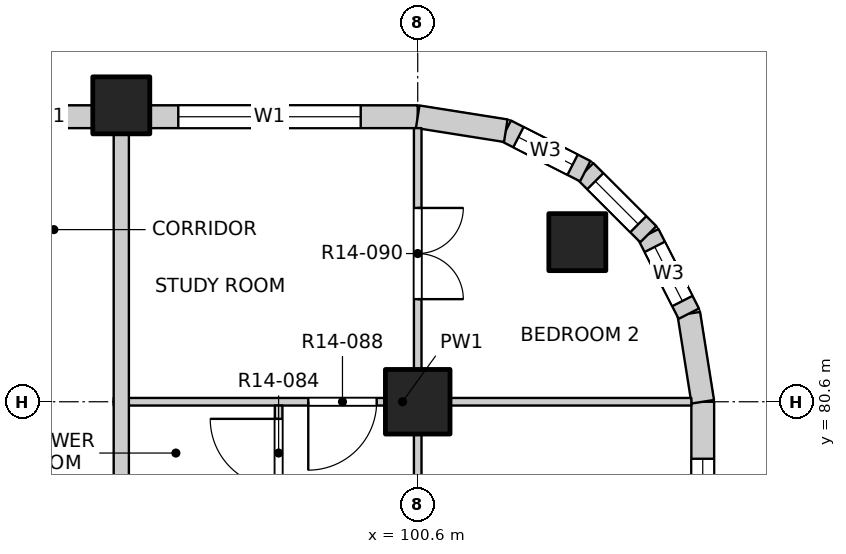
"""IFC4 building model, lengths in metres.
Left out: names, types, materials, properties, quantities, classifications, styles, units other than length and angle.
Written with IfcOpenShell. Run it as: python <this file> out.ifc"""

import sys

from ifc_helpers import new_model, si_unit, direction, frame, frame_2d, origin, origin_2d, place, context, subcontext, project, spatial, rectangle, extrude, element, fill, save


model = new_model("IFC4")
c1 = context("Model", 3, precision=1e-05, world=origin(), true_north=direction((0.0, 1.0)))
c2 = subcontext(c1, "Body", "Model", "MODEL_VIEW")
j1 = project(units=[si_unit("LENGTHUNIT", "METRE"), si_unit("PLANEANGLEUNIT", "RADIAN")], contexts=[c1])
p1 = place(None, origin())
s1 = spatial("IfcSite", under=j1, at=p1, CompositionType="ELEMENT")
p2 = place(p1, origin())
s2 = spatial("IfcBuilding", under=s1, at=p2, CompositionType="ELEMENT")
p3 = place(p2, frame((0.0, 0.0, 152.0)))
s3 = spatial("IfcBuildingStorey", under=s2, at=p3, CompositionType="ELEMENT", Elevation=152.0)
for number, where, z_axis, x_axis in (
    (1, (102.7, 82.7, -0.25), (0.0, 0.0, 1.0), (1.0, 0.0, 0.0)),
    (2, (96.7, 84.5, -0.25), (0.0, 0.0, 1.0), (1.0, 0.0, 0.0)),
):
    element("IfcColumn", number, at=place(p3, frame(where, z_axis=z_axis, x_axis=x_axis)), inside=s3, PredefinedType="COLUMN", context=c2, shape_type="SweptSolid", body=[
        extrude(rectangle(XDim=0.75, YDim=0.75, at=origin_2d()), origin(), (0.0, 0.0, 1.0), 3.4),
    ])
p4 = place(p3, frame((100.6, 80.6, -0.25), z_axis=(0.0, 0.0, 1.0), x_axis=(1.0, 0.0, 0.0)))
e3 = element("IfcColumn", 3, at=p4, inside=s3, PredefinedType="COLUMN", context=c2, shape_type="SweptSolid", body=[
    extrude(rectangle(XDim=0.85, YDim=0.85, at=origin_2d()), origin(), (0.0, 0.0, 1.0), 3.4),
])
p5 = place(p3, frame((104.35, 77.075, 0.0), z_axis=(0.0, 0.0, 1.0), x_axis=(0.0, 1.0, 0.0)))
e4 = element("IfcWall", 4, at=p5, inside=s3, PredefinedType="SOLIDWALL", context=c2, shape_type="SweptSolid", body=[
    extrude(rectangle(XDim=3.525, YDim=0.3, at=frame_2d((1.763, 0.0))), origin(), (0.0, 0.0, 1.0), 2.7),
])
p6 = place(p5, frame((0.375, 0.0, 0.9)))
e5 = element("IfcOpeningElement", 5, at=p6, cuts=e4, PredefinedType="OPENING", context=c2, shape_type="SweptSolid", body=[
    extrude(rectangle(XDim=2.4, YDim=1.8, at=frame_2d((1.2, 0.9))), frame((0.0, 0.16, 0.0), z_axis=(0.0, -1.0, 0.0), x_axis=(1.0, 0.0, 0.0)), (0.0, 0.0, 1.0), 0.32),
])
p7 = place(p3, frame((95.025, 84.35, 0.0), z_axis=(0.0, 0.0, 1.0), x_axis=(1.0, 0.0, 0.0)))
e6 = element("IfcWall", 6, at=p7, inside=s3, PredefinedType="SOLIDWALL", context=c2, shape_type="SweptSolid", body=[
    extrude(rectangle(XDim=1.3, YDim=0.3, at=frame_2d((0.65, 0.0))), origin(), (0.0, 0.0, 1.0), 2.7),
])
p8 = place(p3, frame((97.075, 84.35, 0.0), z_axis=(0.0, 0.0, 1.0), x_axis=(1.0, 0.0, 0.0)))
e7 = element("IfcWall", 7, at=p8, inside=s3, PredefinedType="SOLIDWALL", context=c2, shape_type="SweptSolid", body=[
    extrude(rectangle(XDim=3.525, YDim=0.3, at=frame_2d((1.763, 0.0))), origin(), (0.0, 0.0, 1.0), 2.7),
])
p9 = place(p8, frame((0.375, 0.0, 0.9)))
e8 = element("IfcOpeningElement", 8, at=p9, cuts=e7, PredefinedType="OPENING", context=c2, shape_type="SweptSolid", body=[
    extrude(rectangle(XDim=2.4, YDim=1.8, at=frame_2d((1.2, 0.9))), frame((0.0, 0.16, 0.0), z_axis=(0.0, -1.0, 0.0), x_axis=(1.0, 0.0, 0.0)), (0.0, 0.0, 1.0), 0.32),
])
p10 = place(p3, frame((104.35, 80.6, 0.0), z_axis=(0.0, 0.0, 1.0), x_axis=(-0.156496880861, 0.987678452879, 0.0)))
e9 = element("IfcWall", 9, at=p10, inside=s3, PredefinedType="SOLIDWALL", context=c2, shape_type="SweptSolid", body=[
    extrude(rectangle(XDim=1.173, YDim=0.3, at=frame_2d((0.586, 0.0))), origin(), (0.0, 0.0, 1.0), 2.7),
])
p11 = place(p3, frame((104.167, 81.759, 0.0), z_axis=(0.0, 0.0, 1.0), x_axis=(-0.454025524128, 0.890988677504, 0.0)))
e10 = element("IfcWall", 10, at=p11, inside=s3, PredefinedType="SOLIDWALL", context=c2, shape_type="SweptSolid", body=[
    extrude(rectangle(XDim=1.173, YDim=0.3, at=frame_2d((0.587, 0.0))), origin(), (0.0, 0.0, 1.0), 2.7),
])
p12 = place(p11, frame((0.187, 0.0, 0.9)))
e11 = element("IfcOpeningElement", 11, at=p12, cuts=e10, PredefinedType="OPENING", context=c2, shape_type="SweptSolid", body=[
    extrude(rectangle(XDim=0.8, YDim=1.2, at=frame_2d((0.4, 0.6))), frame((0.0, 0.16, 0.0), z_axis=(0.0, -1.0, 0.0), x_axis=(1.0, 0.0, 0.0)), (0.0, 0.0, 1.0), 0.32),
])
p13 = place(p3, frame((103.634, 82.804, 0.0), z_axis=(0.0, 0.0, 1.0), x_axis=(-0.707106781187, 0.707106781187, 0.0)))
e12 = element("IfcWall", 12, at=p13, inside=s3, PredefinedType="SOLIDWALL", context=c2, shape_type="SweptSolid", body=[
    extrude(rectangle(XDim=1.173, YDim=0.3, at=frame_2d((0.586, 0.0))), origin(), (0.0, 0.0, 1.0), 2.7),
])
p14 = place(p13, frame((0.187, 0.0, 0.9)))
e13 = element("IfcOpeningElement", 13, at=p14, cuts=e12, PredefinedType="OPENING", context=c2, shape_type="SweptSolid", body=[
    extrude(rectangle(XDim=0.8, YDim=1.2, at=frame_2d((0.4, 0.6))), frame((0.0, 0.16, 0.0), z_axis=(0.0, -1.0, 0.0), x_axis=(1.0, 0.0, 0.0)), (0.0, 0.0, 1.0), 0.32),
])
p15 = place(p3, frame((102.804, 83.634, 0.0), z_axis=(0.0, 0.0, 1.0), x_axis=(-0.890988677504, 0.454025524128, 0.0)))
e14 = element("IfcWall", 14, at=p15, inside=s3, PredefinedType="SOLIDWALL", context=c2, shape_type="SweptSolid", body=[
    extrude(rectangle(XDim=1.173, YDim=0.3, at=frame_2d((0.587, 0.0))), origin(), (0.0, 0.0, 1.0), 2.7),
])
p16 = place(p15, frame((0.187, 0.0, 0.9)))
e15 = element("IfcOpeningElement", 15, at=p16, cuts=e14, PredefinedType="OPENING", context=c2, shape_type="SweptSolid", body=[
    extrude(rectangle(XDim=0.8, YDim=1.2, at=frame_2d((0.4, 0.6))), frame((0.0, 0.16, 0.0), z_axis=(0.0, -1.0, 0.0), x_axis=(1.0, 0.0, 0.0)), (0.0, 0.0, 1.0), 0.32),
])
p17 = place(p3, frame((101.759, 84.167, 0.0), z_axis=(0.0, 0.0, 1.0), x_axis=(-0.987678452879, 0.156496880861, 0.0)))
e16 = element("IfcWall", 16, at=p17, inside=s3, PredefinedType="SOLIDWALL", context=c2, shape_type="SweptSolid", body=[
    extrude(rectangle(XDim=1.173, YDim=0.3, at=frame_2d((0.586, 0.0))), origin(), (0.0, 0.0, 1.0), 2.7),
])
p18 = place(p3, frame((96.6, 80.6, 0.0), z_axis=(0.0, 0.0, 1.0), x_axis=(1.0, 0.0, 0.0)))
e17 = element("IfcWall", 17, at=p18, inside=s3, PredefinedType="PARTITIONING", context=c2, shape_type="SweptSolid", body=[
    extrude(rectangle(XDim=7.6, YDim=0.1, at=frame_2d((3.8, 0.0))), origin(), (0.0, 0.0, 1.0), 3.15),
])
p19 = place(p18, frame((2.56, 0.0, 0.0)))
e18 = element("IfcOpeningElement", 18, at=p19, cuts=e17, PredefinedType="OPENING", context=c2, shape_type="SweptSolid", body=[
    extrude(rectangle(XDim=0.9, YDim=2.1, at=frame_2d((0.45, 1.05))), frame((0.0, 0.06, 0.0), z_axis=(0.0, -1.0, 0.0), x_axis=(1.0, 0.0, 0.0)), (0.0, 0.0, 1.0), 0.12),
])
p20 = place(p3, frame((96.7, 49.5, 0.0), z_axis=(0.0, 0.0, 1.0), x_axis=(0.0, 1.0, 0.0)))
e19 = element("IfcWall", 19, at=p20, inside=s3, PredefinedType="PARTITIONING", context=c2, shape_type="SweptSolid", body=[
    extrude(rectangle(XDim=34.7, YDim=0.2, at=frame_2d((17.35, 0.0))), origin(), (0.0, 0.0, 1.0), 3.15),
])
p21 = place(p20, frame((3.225, 0.0, 0.0)))
e20 = element("IfcOpeningElement", 20, at=p21, cuts=e19, PredefinedType="OPENING", context=c2, shape_type="SweptSolid", body=[
    extrude(rectangle(XDim=1.0, YDim=2.1, at=frame_2d((0.5, 1.05))), frame((0.0, 0.11, 0.0), z_axis=(0.0, -1.0, 0.0), x_axis=(1.0, 0.0, 0.0)), (0.0, 0.0, 1.0), 0.22),
])
p22 = place(p20, frame((19.775, 0.0, 0.0)))
e21 = element("IfcOpeningElement", 21, at=p22, cuts=e19, PredefinedType="OPENING", context=c2, shape_type="SweptSolid", body=[
    extrude(rectangle(XDim=1.0, YDim=2.1, at=frame_2d((0.5, 1.05))), frame((0.0, 0.11, 0.0), z_axis=(0.0, -1.0, 0.0), x_axis=(1.0, 0.0, 0.0)), (0.0, 0.0, 1.0), 0.22),
])
p23 = place(p20, frame((24.125, 0.0, 0.0)))
e22 = element("IfcOpeningElement", 22, at=p23, cuts=e19, PredefinedType="OPENING", context=c2, shape_type="SweptSolid", body=[
    extrude(rectangle(XDim=1.0, YDim=2.1, at=frame_2d((0.5, 1.05))), frame((0.0, 0.11, 0.0), z_axis=(0.0, -1.0, 0.0), x_axis=(1.0, 0.0, 0.0)), (0.0, 0.0, 1.0), 0.22),
])
p24 = place(p3, frame((98.77, 75.95, 0.0), z_axis=(0.0, 0.0, 1.0), x_axis=(0.0, 1.0, 0.0)))
e23 = element("IfcWall", 23, at=p24, inside=s3, PredefinedType="PARTITIONING", context=c2, shape_type="SweptSolid", body=[
    extrude(rectangle(XDim=4.6, YDim=0.1, at=frame_2d((2.3, 0.0))), origin(), (0.0, 0.0, 1.0), 3.15),
])
p25 = place(p24, frame((0.175, 0.0, 0.0)))
e24 = element("IfcOpeningElement", 24, at=p25, cuts=e23, PredefinedType="OPENING", context=c2, shape_type="SweptSolid", body=[
    extrude(rectangle(XDim=0.8, YDim=2.1, at=frame_2d((0.4, 1.05))), frame((0.0, 0.06, 0.0), z_axis=(0.0, -1.0, 0.0), x_axis=(1.0, 0.0, 0.0)), (0.0, 0.0, 1.0), 0.12),
])
p26 = place(p24, frame((1.8, 0.0, 0.0)))
e25 = element("IfcOpeningElement", 25, at=p26, cuts=e23, PredefinedType="OPENING", context=c2, shape_type="SweptSolid", body=[
    extrude(rectangle(XDim=0.9, YDim=2.1, at=frame_2d((0.45, 1.05))), frame((0.0, 0.06, 0.0), z_axis=(0.0, -1.0, 0.0), x_axis=(1.0, 0.0, 0.0)), (0.0, 0.0, 1.0), 0.12),
])
p27 = place(p24, frame((3.525, 0.0, 0.0)))
e26 = element("IfcOpeningElement", 26, at=p27, cuts=e23, PredefinedType="OPENING", context=c2, shape_type="SweptSolid", body=[
    extrude(rectangle(XDim=0.9, YDim=2.1, at=frame_2d((0.45, 1.05))), frame((0.0, 0.06, 0.0), z_axis=(0.0, -1.0, 0.0), x_axis=(1.0, 0.0, 0.0)), (0.0, 0.0, 1.0), 0.12),
])
p28 = place(p3, frame((100.6, 45.8, 0.0), z_axis=(0.0, 0.0, 1.0), x_axis=(0.0, 1.0, 0.0)))
e27 = element("IfcWall", 27, at=p28, inside=s3, PredefinedType="PARTITIONING", context=c2, shape_type="SweptSolid", body=[
    extrude(rectangle(XDim=38.4, YDim=0.1, at=frame_2d((19.2, 0.0))), origin(), (0.0, 0.0, 1.0), 3.15),
])
p29 = place(p28, frame((1.05, 0.0, 0.0)))
e28 = element("IfcOpeningElement", 28, at=p29, cuts=e27, PredefinedType="OPENING", context=c2, shape_type="SweptSolid", body=[
    extrude(rectangle(XDim=1.2, YDim=2.1, at=frame_2d((0.6, 1.05))), frame((0.0, 0.06, 0.0), z_axis=(0.0, -1.0, 0.0), x_axis=(1.0, 0.0, 0.0)), (0.0, 0.0, 1.0), 0.12),
])
p30 = place(p28, frame((5.1, 0.0, 0.0)))
e29 = element("IfcOpeningElement", 29, at=p30, cuts=e27, PredefinedType="OPENING", context=c2, shape_type="SweptSolid", body=[
    extrude(rectangle(XDim=0.9, YDim=2.1, at=frame_2d((0.45, 1.05))), frame((0.0, 0.06, 0.0), z_axis=(0.0, -1.0, 0.0), x_axis=(1.0, 0.0, 0.0)), (0.0, 0.0, 1.0), 0.12),
])
p31 = place(p28, frame((9.0, 0.0, 0.0)))
e30 = element("IfcOpeningElement", 30, at=p31, cuts=e27, PredefinedType="OPENING", context=c2, shape_type="SweptSolid", body=[
    extrude(rectangle(XDim=0.9, YDim=2.1, at=frame_2d((0.45, 1.05))), frame((0.0, 0.06, 0.0), z_axis=(0.0, -1.0, 0.0), x_axis=(1.0, 0.0, 0.0)), (0.0, 0.0, 1.0), 0.12),
])
p32 = place(p28, frame((12.9, 0.0, 0.0)))
e31 = element("IfcOpeningElement", 31, at=p32, cuts=e27, PredefinedType="OPENING", context=c2, shape_type="SweptSolid", body=[
    extrude(rectangle(XDim=0.9, YDim=2.1, at=frame_2d((0.45, 1.05))), frame((0.0, 0.06, 0.0), z_axis=(0.0, -1.0, 0.0), x_axis=(1.0, 0.0, 0.0)), (0.0, 0.0, 1.0), 0.12),
])
p33 = place(p28, frame((16.8, 0.0, 0.0)))
e32 = element("IfcOpeningElement", 32, at=p33, cuts=e27, PredefinedType="OPENING", context=c2, shape_type="SweptSolid", body=[
    extrude(rectangle(XDim=0.9, YDim=2.1, at=frame_2d((0.45, 1.05))), frame((0.0, 0.06, 0.0), z_axis=(0.0, -1.0, 0.0), x_axis=(1.0, 0.0, 0.0)), (0.0, 0.0, 1.0), 0.12),
])
p34 = place(p28, frame((20.7, 0.0, 0.0)))
e33 = element("IfcOpeningElement", 33, at=p34, cuts=e27, PredefinedType="OPENING", context=c2, shape_type="SweptSolid", body=[
    extrude(rectangle(XDim=0.9, YDim=2.1, at=frame_2d((0.45, 1.05))), frame((0.0, 0.06, 0.0), z_axis=(0.0, -1.0, 0.0), x_axis=(1.0, 0.0, 0.0)), (0.0, 0.0, 1.0), 0.12),
])
p35 = place(p28, frame((24.6, 0.0, 0.0)))
e34 = element("IfcOpeningElement", 34, at=p35, cuts=e27, PredefinedType="OPENING", context=c2, shape_type="SweptSolid", body=[
    extrude(rectangle(XDim=0.9, YDim=2.1, at=frame_2d((0.45, 1.05))), frame((0.0, 0.06, 0.0), z_axis=(0.0, -1.0, 0.0), x_axis=(1.0, 0.0, 0.0)), (0.0, 0.0, 1.0), 0.12),
])
p36 = place(p28, frame((28.5, 0.0, 0.0)))
e35 = element("IfcOpeningElement", 35, at=p36, cuts=e27, PredefinedType="OPENING", context=c2, shape_type="SweptSolid", body=[
    extrude(rectangle(XDim=0.9, YDim=2.1, at=frame_2d((0.45, 1.05))), frame((0.0, 0.06, 0.0), z_axis=(0.0, -1.0, 0.0), x_axis=(1.0, 0.0, 0.0)), (0.0, 0.0, 1.0), 0.12),
])
p37 = place(p28, frame((32.4, 0.0, 0.0)))
e36 = element("IfcOpeningElement", 36, at=p37, cuts=e27, PredefinedType="OPENING", context=c2, shape_type="SweptSolid", body=[
    extrude(rectangle(XDim=0.9, YDim=2.1, at=frame_2d((0.45, 1.05))), frame((0.0, 0.06, 0.0), z_axis=(0.0, -1.0, 0.0), x_axis=(1.0, 0.0, 0.0)), (0.0, 0.0, 1.0), 0.12),
])
p38 = place(p28, frame((36.15, 0.0, 0.0)))
e37 = element("IfcOpeningElement", 37, at=p38, cuts=e27, PredefinedType="OPENING", context=c2, shape_type="SweptSolid", body=[
    extrude(rectangle(XDim=1.2, YDim=2.1, at=frame_2d((0.6, 1.05))), frame((0.0, 0.06, 0.0), z_axis=(0.0, -1.0, 0.0), x_axis=(1.0, 0.0, 0.0)), (0.0, 0.0, 1.0), 0.12),
])
p39 = place(p6, origin())
e38 = element("IfcWindow", 38, at=p39, inside=s3, PartitioningType="DOUBLE_PANEL_VERTICAL", PredefinedType="WINDOW", context=c2, shape_type="SweptSolid", body=[
    extrude(rectangle(XDim=2.4, YDim=1.8, at=frame_2d((1.2, 0.9))), frame((0.0, 0.03, 0.0), z_axis=(0.0, -1.0, 0.0), x_axis=(1.0, 0.0, 0.0)), (0.0, 0.0, 1.0), 0.06),
])
fill(e5, e38)
p40 = place(p9, origin())
e39 = element("IfcWindow", 39, at=p40, inside=s3, PartitioningType="DOUBLE_PANEL_VERTICAL", PredefinedType="WINDOW", context=c2, shape_type="SweptSolid", body=[
    extrude(rectangle(XDim=2.4, YDim=1.8, at=frame_2d((1.2, 0.9))), frame((0.0, 0.03, 0.0), z_axis=(0.0, -1.0, 0.0), x_axis=(1.0, 0.0, 0.0)), (0.0, 0.0, 1.0), 0.06),
])
fill(e8, e39)
p41 = place(p12, origin())
e40 = element("IfcWindow", 40, at=p41, inside=s3, PartitioningType="SINGLE_PANEL", PredefinedType="WINDOW", context=c2, shape_type="SweptSolid", body=[
    extrude(rectangle(XDim=0.8, YDim=1.2, at=frame_2d((0.4, 0.6))), frame((0.0, 0.03, 0.0), z_axis=(0.0, -1.0, 0.0), x_axis=(1.0, 0.0, 0.0)), (0.0, 0.0, 1.0), 0.06),
])
fill(e11, e40)
p42 = place(p14, origin())
e41 = element("IfcWindow", 41, at=p42, inside=s3, PartitioningType="SINGLE_PANEL", PredefinedType="WINDOW", context=c2, shape_type="SweptSolid", body=[
    extrude(rectangle(XDim=0.8, YDim=1.2, at=frame_2d((0.4, 0.6))), frame((0.0, 0.03, 0.0), z_axis=(0.0, -1.0, 0.0), x_axis=(1.0, 0.0, 0.0)), (0.0, 0.0, 1.0), 0.06),
])
fill(e13, e41)
p43 = place(p16, origin())
e42 = element("IfcWindow", 42, at=p43, inside=s3, PartitioningType="SINGLE_PANEL", PredefinedType="WINDOW", context=c2, shape_type="SweptSolid", body=[
    extrude(rectangle(XDim=0.8, YDim=1.2, at=frame_2d((0.4, 0.6))), frame((0.0, 0.03, 0.0), z_axis=(0.0, -1.0, 0.0), x_axis=(1.0, 0.0, 0.0)), (0.0, 0.0, 1.0), 0.06),
])
fill(e15, e42)
p44 = place(p27, origin())
e43 = element("IfcDoor", 43, at=p44, inside=s3, OperationType="SINGLE_SWING_RIGHT", PredefinedType="DOOR", context=c2, shape_type="SweptSolid", body=[
    extrude(rectangle(XDim=0.9, YDim=2.1, at=frame_2d((0.45, 1.05))), frame((0.0, 0.025, 0.0), z_axis=(0.0, -1.0, 0.0), x_axis=(1.0, 0.0, 0.0)), (0.0, 0.0, 1.0), 0.05),
])
fill(e26, e43)
p45 = place(p19, origin())
e44 = element("IfcDoor", 44, at=p45, inside=s3, OperationType="SINGLE_SWING_RIGHT", PredefinedType="DOOR", context=c2, shape_type="SweptSolid", body=[
    extrude(rectangle(XDim=0.9, YDim=2.1, at=frame_2d((0.45, 1.05))), frame((0.0, 0.025, 0.0), z_axis=(0.0, -1.0, 0.0), x_axis=(1.0, 0.0, 0.0)), (0.0, 0.0, 1.0), 0.05),
])
fill(e18, e44)
p46 = place(p38, origin())
e45 = element("IfcDoor", 45, at=p46, inside=s3, OperationType="DOUBLE_DOOR_SINGLE_SWING", PredefinedType="DOOR", context=c2, shape_type="SweptSolid", body=[
    extrude(rectangle(XDim=1.2, YDim=2.1, at=frame_2d((0.6, 1.05))), frame((0.0, 0.025, 0.0), z_axis=(0.0, -1.0, 0.0), x_axis=(1.0, 0.0, 0.0)), (0.0, 0.0, 1.0), 0.05),
])
fill(e37, e45)
save(model, sys.argv[1])
